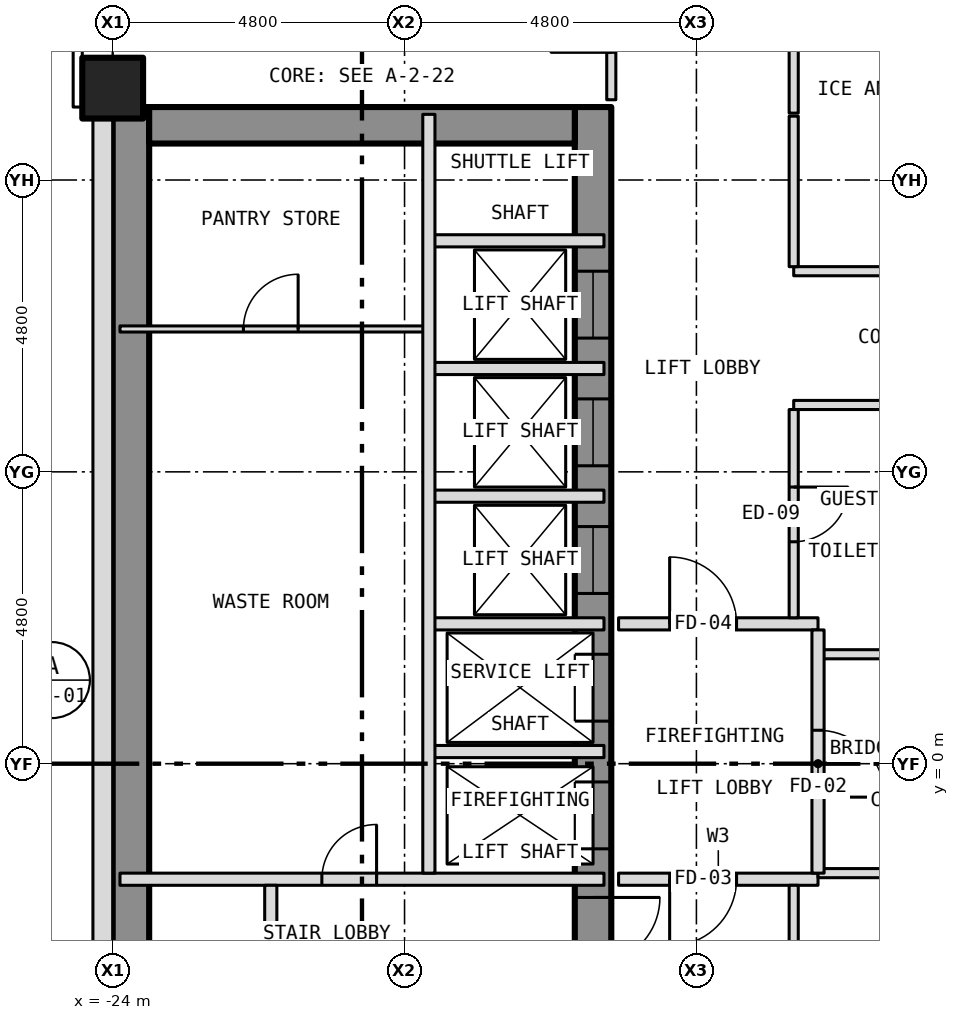
"""IFC4 building model, lengths in metres.
Left out: names, types, materials, properties, quantities, classifications, styles, units other than length and angle.
Written with IfcOpenShell. Run it as: python <this file> out.ifc"""

import sys

from ifc_helpers import new_model, si_unit, direction, frame, frame_2d, origin, origin_2d, place, context, subcontext, project, spatial, rectangle, hollow_rectangle, extrude, element, fill, save


model = new_model("IFC4")
c1 = context("Model", 3, precision=1e-05, world=origin(), true_north=direction((0.0, 1.0)))
c2 = subcontext(c1, "Body", "Model", "MODEL_VIEW")
j1 = project(units=[si_unit("LENGTHUNIT", "METRE"), si_unit("PLANEANGLEUNIT", "RADIAN")], contexts=[c1])
p1 = place(None, origin())
s1 = spatial("IfcSite", under=j1, at=p1, CompositionType="ELEMENT")
p2 = place(p1, origin())
s2 = spatial("IfcBuilding", under=s1, at=p2, CompositionType="ELEMENT")
p3 = place(p2, frame((0.0, 0.0, 81.0)))
s3 = spatial("IfcBuildingStorey", under=s2, at=p3, CompositionType="ELEMENT", Elevation=81.0)
p4 = place(p3, frame((-24.0, 11.111, -0.15), z_axis=(0.0, 0.0, 1.0), x_axis=(1.0, 0.0, 0.0)))
e1 = element("IfcColumn", 1, at=p4, inside=s3, PredefinedType="COLUMN", context=c2, shape_type="SweptSolid", body=[
    extrude(hollow_rectangle(XDim=1.0, YDim=1.0, WallThickness=0.06, at=origin_2d()), origin(), (0.0, 0.0, 1.0), 3.35),
])
p5 = place(p3, frame((-16.1, -10.8, 0.0), z_axis=(0.0, 0.0, 1.0), x_axis=(0.0, 1.0, 0.0)))
e2 = element("IfcWall", 2, at=p5, inside=s3, PredefinedType="SHEAR", context=c2, shape_type="SweptSolid", body=[
    extrude(rectangle(XDim=21.6, YDim=0.6, at=frame_2d((10.8, 0.0))), origin(), (0.0, 0.0, 1.0), 2.9),
])
p6 = place(p5, frame((9.4, 0.0, 0.0)))
e3 = element("IfcOpeningElement", 3, at=p6, cuts=e2, PredefinedType="OPENING", context=c2, shape_type="SweptSolid", body=[
    extrude(rectangle(XDim=1.1, YDim=2.1, at=frame_2d((0.55, 1.05))), frame((0.0, 0.312, 0.0), z_axis=(0.0, -1.0, 0.0), x_axis=(1.0, 0.0, 0.0)), (0.0, 0.0, 1.0), 0.624),
])
p7 = place(p5, frame((11.5, 0.0, 0.0)))
e4 = element("IfcOpeningElement", 4, at=p7, cuts=e2, PredefinedType="OPENING", context=c2, shape_type="SweptSolid", body=[
    extrude(rectangle(XDim=1.1, YDim=2.1, at=frame_2d((0.55, 1.05))), frame((0.0, 0.312, 0.0), z_axis=(0.0, -1.0, 0.0), x_axis=(1.0, 0.0, 0.0)), (0.0, 0.0, 1.0), 0.624),
])
p8 = place(p5, frame((13.6, 0.0, 0.0)))
e5 = element("IfcOpeningElement", 5, at=p8, cuts=e2, PredefinedType="OPENING", context=c2, shape_type="SweptSolid", body=[
    extrude(rectangle(XDim=1.1, YDim=2.1, at=frame_2d((0.55, 1.05))), frame((0.0, 0.312, 0.0), z_axis=(0.0, -1.0, 0.0), x_axis=(1.0, 0.0, 0.0)), (0.0, 0.0, 1.0), 0.624),
])
p9 = place(p5, frame((15.7, 0.0, 0.0)))
e6 = element("IfcOpeningElement", 6, at=p9, cuts=e2, PredefinedType="OPENING", context=c2, shape_type="SweptSolid", body=[
    extrude(rectangle(XDim=1.1, YDim=2.1, at=frame_2d((0.55, 1.05))), frame((0.0, 0.312, 0.0), z_axis=(0.0, -1.0, 0.0), x_axis=(1.0, 0.0, 0.0)), (0.0, 0.0, 1.0), 0.624),
])
p10 = place(p5, frame((17.8, 0.0, 0.0)))
e7 = element("IfcOpeningElement", 7, at=p10, cuts=e2, PredefinedType="OPENING", context=c2, shape_type="SweptSolid", body=[
    extrude(rectangle(XDim=1.1, YDim=2.1, at=frame_2d((0.55, 1.05))), frame((0.0, 0.312, 0.0), z_axis=(0.0, -1.0, 0.0), x_axis=(1.0, 0.0, 0.0)), (0.0, 0.0, 1.0), 0.624),
])
p11 = place(p5, frame((0.758, 0.0, 0.0)))
e8 = element("IfcOpeningElement", 8, at=p11, cuts=e2, PredefinedType="OPENING", context=c2, shape_type="SweptSolid", body=[
    extrude(rectangle(XDim=1.1, YDim=2.1, at=frame_2d((0.55, 1.05))), frame((0.0, 0.312, 0.0), z_axis=(0.0, -1.0, 0.0), x_axis=(1.0, 0.0, 0.0)), (0.0, 0.0, 1.0), 0.624),
])
p12 = place(p5, frame((7.5, 0.0, 0.0)))
e9 = element("IfcOpeningElement", 9, at=p12, cuts=e2, PredefinedType="OPENING", context=c2, shape_type="SweptSolid", body=[
    extrude(rectangle(XDim=1.1, YDim=2.1, at=frame_2d((0.55, 1.05))), frame((0.0, 0.312, 0.0), z_axis=(0.0, -1.0, 0.0), x_axis=(1.0, 0.0, 0.0)), (0.0, 0.0, 1.0), 0.624),
])
p13 = place(p3, frame((-23.7, -10.8, 0.0), z_axis=(0.0, 0.0, 1.0), x_axis=(0.0, 1.0, 0.0)))
e10 = element("IfcWall", 10, at=p13, inside=s3, PredefinedType="SHEAR", context=c2, shape_type="SweptSolid", body=[
    extrude(rectangle(XDim=21.6, YDim=0.6, at=frame_2d((10.8, 0.0))), origin(), (0.0, 0.0, 1.0), 2.9),
])
p14 = place(p3, frame((-23.4, 10.5, 0.0), z_axis=(0.0, 0.0, 1.0), x_axis=(1.0, 0.0, 0.0)))
e11 = element("IfcWall", 11, at=p14, inside=s3, PredefinedType="SHEAR", context=c2, shape_type="SweptSolid", body=[
    extrude(rectangle(XDim=7.0, YDim=0.6, at=frame_2d((3.5, 0.0))), origin(), (0.0, 0.0, 1.0), 2.9),
])
p15 = place(p3, frame((-24.163, 10.8, 0.0), z_axis=(0.0, 0.0, 1.0), x_axis=(0.0, -1.0, 0.0)))
e12 = element("IfcWall", 12, at=p15, inside=s3, PredefinedType="SOLIDWALL", context=c2, shape_type="SweptSolid", body=[
    extrude(rectangle(XDim=21.6, YDim=0.325, at=frame_2d((10.8, 0.0))), origin(), (0.0, 0.0, 1.0), 3.5),
])
p16 = place(p15, frame((18.05, 0.0, 1.0)))
e13 = element("IfcOpeningElement", 13, at=p16, cuts=e12, PredefinedType="OPENING", context=c2, shape_type="SweptSolid", body=[
    extrude(rectangle(XDim=0.6, YDim=1.5, at=frame_2d((0.3, 0.75))), frame((0.0, 0.175, 0.0), z_axis=(0.0, -1.0, 0.0), x_axis=(1.0, 0.0, 0.0)), (0.0, 0.0, 1.0), 0.349),
])
p17 = place(p3, frame((-23.88, -1.9, 0.0), z_axis=(0.0, 0.0, 1.0), x_axis=(1.0, 0.0, 0.0)))
e14 = element("IfcWall", 14, at=p17, inside=s3, PredefinedType="PARTITIONING", context=c2, shape_type="SweptSolid", body=[
    extrude(rectangle(XDim=7.96, YDim=0.2, at=frame_2d((3.98, 0.0))), origin(), (0.0, 0.0, 1.0), 2.9),
])
p18 = place(p17, frame((3.32, 0.0, 0.0)))
e15 = element("IfcOpeningElement", 15, at=p18, cuts=e14, PredefinedType="OPENING", context=c2, shape_type="SweptSolid", body=[
    extrude(rectangle(XDim=0.9, YDim=2.1, at=frame_2d((0.45, 1.05))), frame((0.0, 0.112, 0.0), z_axis=(0.0, -1.0, 0.0), x_axis=(1.0, 0.0, 0.0)), (0.0, 0.0, 1.0), 0.224),
])
p19 = place(p3, frame((-15.68, -1.9, 0.0), z_axis=(0.0, 0.0, 1.0), x_axis=(1.0, 0.0, 0.0)))
e16 = element("IfcWall", 16, at=p19, inside=s3, PredefinedType="PARTITIONING", context=c2, shape_type="SweptSolid", body=[
    extrude(rectangle(XDim=3.28, YDim=0.2, at=frame_2d((1.64, 0.0))), origin(), (0.0, 0.0, 1.0), 3.2),
])
p20 = place(p19, frame((0.84, 0.0, 0.0)))
e17 = element("IfcOpeningElement", 17, at=p20, cuts=e16, PredefinedType="OPENING", context=c2, shape_type="SweptSolid", body=[
    extrude(rectangle(XDim=1.1, YDim=2.1, at=frame_2d((0.55, 1.05))), frame((0.0, 0.112, 0.0), z_axis=(0.0, -1.0, 0.0), x_axis=(1.0, 0.0, 0.0)), (0.0, 0.0, 1.0), 0.224),
])
p21 = place(p3, frame((-12.4, -1.8, 0.0), z_axis=(0.0, 0.0, 1.0), x_axis=(1.0, 0.0, 0.0)))
e18 = element("IfcWall", 18, at=p21, inside=s3, PredefinedType="PARTITIONING", context=c2, shape_type="SweptSolid", body=[
    extrude(rectangle(XDim=3.28, YDim=0.15, at=frame_2d((1.64, 0.0))), origin(), (0.0, 0.0, 1.0), 3.2),
])
p22 = place(p3, frame((-18.8, 0.2, 0.0), z_axis=(0.0, 0.0, 1.0), x_axis=(1.0, 0.0, 0.0)))
e19 = element("IfcWall", 19, at=p22, inside=s3, PredefinedType="PARTITIONING", context=c2, shape_type="SweptSolid", body=[
    extrude(rectangle(XDim=2.88, YDim=0.2, at=frame_2d((1.44, 0.0))), origin(), (0.0, 0.0, 1.0), 2.9),
])
p23 = place(p3, frame((-12.4, 1.8, 0.0), z_axis=(0.0, 0.0, 1.0), x_axis=(1.0, 0.0, 0.0)))
e20 = element("IfcWall", 20, at=p23, inside=s3, PredefinedType="PARTITIONING", context=c2, shape_type="SweptSolid", body=[
    extrude(rectangle(XDim=3.25, YDim=0.15, at=frame_2d((1.625, 0.0))), origin(), (0.0, 0.0, 1.0), 3.2),
])
p24 = place(p3, frame((-18.8, 2.3, 0.0), z_axis=(0.0, 0.0, 1.0), x_axis=(1.0, 0.0, 0.0)))
e21 = element("IfcWall", 21, at=p24, inside=s3, PredefinedType="PARTITIONING", context=c2, shape_type="SweptSolid", body=[
    extrude(rectangle(XDim=2.88, YDim=0.2, at=frame_2d((1.44, 0.0))), origin(), (0.0, 0.0, 1.0), 2.9),
])
p25 = place(p3, frame((-15.68, 2.3, 0.0), z_axis=(0.0, 0.0, 1.0), x_axis=(1.0, 0.0, 0.0)))
e22 = element("IfcWall", 22, at=p25, inside=s3, PredefinedType="PARTITIONING", context=c2, shape_type="SweptSolid", body=[
    extrude(rectangle(XDim=3.28, YDim=0.2, at=frame_2d((1.64, 0.0))), origin(), (0.0, 0.0, 1.0), 3.2),
])
p26 = place(p25, frame((0.84, 0.0, 0.0)))
e23 = element("IfcOpeningElement", 23, at=p26, cuts=e22, PredefinedType="OPENING", context=c2, shape_type="SweptSolid", body=[
    extrude(rectangle(XDim=1.1, YDim=2.1, at=frame_2d((0.55, 1.05))), frame((0.0, 0.112, 0.0), z_axis=(0.0, -1.0, 0.0), x_axis=(1.0, 0.0, 0.0)), (0.0, 0.0, 1.0), 0.224),
])
p27 = place(p3, frame((-18.8, 4.4, 0.0), z_axis=(0.0, 0.0, 1.0), x_axis=(1.0, 0.0, 0.0)))
e24 = element("IfcWall", 24, at=p27, inside=s3, PredefinedType="PARTITIONING", context=c2, shape_type="SweptSolid", body=[
    extrude(rectangle(XDim=2.88, YDim=0.2, at=frame_2d((1.44, 0.0))), origin(), (0.0, 0.0, 1.0), 2.9),
])
p28 = place(p3, frame((-12.8, 5.9, 0.0), z_axis=(0.0, 0.0, 1.0), x_axis=(1.0, 0.0, 0.0)))
e25 = element("IfcWall", 25, at=p28, inside=s3, PredefinedType="PARTITIONING", context=c2, shape_type="SweptSolid", body=[
    extrude(rectangle(XDim=3.65, YDim=0.15, at=frame_2d((1.825, 0.0))), origin(), (0.0, 0.0, 1.0), 3.2),
])
p29 = place(p28, frame((2.288, 0.0, 0.0)))
e26 = element("IfcOpeningElement", 26, at=p29, cuts=e25, PredefinedType="OPENING", context=c2, shape_type="SweptSolid", body=[
    extrude(rectangle(XDim=0.9, YDim=2.1, at=frame_2d((0.45, 1.05))), frame((0.0, 0.087, 0.0), z_axis=(0.0, -1.0, 0.0), x_axis=(1.0, 0.0, 0.0)), (0.0, 0.0, 1.0), 0.174),
])
p30 = place(p3, frame((-18.8, 6.5, 0.0), z_axis=(0.0, 0.0, 1.0), x_axis=(1.0, 0.0, 0.0)))
e27 = element("IfcWall", 27, at=p30, inside=s3, PredefinedType="PARTITIONING", context=c2, shape_type="SweptSolid", body=[
    extrude(rectangle(XDim=2.88, YDim=0.2, at=frame_2d((1.44, 0.0))), origin(), (0.0, 0.0, 1.0), 2.9),
])
p31 = place(p3, frame((-23.88, 7.15, 0.0), z_axis=(0.0, 0.0, 1.0), x_axis=(1.0, 0.0, 0.0)))
e28 = element("IfcWall", 28, at=p31, inside=s3, PredefinedType="PARTITIONING", context=c2, shape_type="SweptSolid", body=[
    extrude(rectangle(XDim=5.08, YDim=0.1, at=frame_2d((2.54, 0.0))), origin(), (0.0, 0.0, 1.0), 2.9),
])
p32 = place(p31, frame((2.03, 0.0, 0.0)))
e29 = element("IfcOpeningElement", 29, at=p32, cuts=e28, PredefinedType="OPENING", context=c2, shape_type="SweptSolid", body=[
    extrude(rectangle(XDim=0.9, YDim=2.1, at=frame_2d((0.45, 1.05))), frame((0.0, 0.062, 0.0), z_axis=(0.0, -1.0, 0.0), x_axis=(1.0, 0.0, 0.0)), (0.0, 0.0, 1.0), 0.124),
])
p33 = place(p3, frame((-12.8, 8.1, 0.0), z_axis=(0.0, 0.0, 1.0), x_axis=(1.0, 0.0, 0.0)))
e30 = element("IfcWall", 30, at=p33, inside=s3, PredefinedType="PARTITIONING", context=c2, shape_type="SweptSolid", body=[
    extrude(rectangle(XDim=3.68, YDim=0.15, at=frame_2d((1.84, 0.0))), origin(), (0.0, 0.0, 1.0), 3.2),
])
p34 = place(p3, frame((-18.8, 8.6, 0.0), z_axis=(0.0, 0.0, 1.0), x_axis=(1.0, 0.0, 0.0)))
e31 = element("IfcWall", 31, at=p34, inside=s3, PredefinedType="PARTITIONING", context=c2, shape_type="SweptSolid", body=[
    extrude(rectangle(XDim=2.88, YDim=0.2, at=frame_2d((1.44, 0.0))), origin(), (0.0, 0.0, 1.0), 2.9),
])
p35 = place(p3, frame((-21.4, -10.68, 0.0), z_axis=(0.0, 0.0, 1.0), x_axis=(0.0, 1.0, 0.0)))
e32 = element("IfcWall", 32, at=p35, inside=s3, PredefinedType="PARTITIONING", context=c2, shape_type="SweptSolid", body=[
    extrude(rectangle(XDim=8.68, YDim=0.2, at=frame_2d((4.34, 0.0))), origin(), (0.0, 0.0, 1.0), 2.9),
])
p36 = place(p35, frame((1.21, 0.0, 0.0)))
e33 = element("IfcOpeningElement", 33, at=p36, cuts=e32, PredefinedType="OPENING", context=c2, shape_type="SweptSolid", body=[
    extrude(rectangle(XDim=0.9, YDim=2.1, at=frame_2d((0.45, 1.05))), frame((0.0, 0.112, 0.0), z_axis=(0.0, -1.0, 0.0), x_axis=(1.0, 0.0, 0.0)), (0.0, 0.0, 1.0), 0.224),
])
p37 = place(p35, frame((5.66, 0.0, 0.0)))
e34 = element("IfcOpeningElement", 34, at=p37, cuts=e32, PredefinedType="OPENING", context=c2, shape_type="SweptSolid", body=[
    extrude(rectangle(XDim=0.9, YDim=2.1, at=frame_2d((0.45, 1.05))), frame((0.0, 0.112, 0.0), z_axis=(0.0, -1.0, 0.0), x_axis=(1.0, 0.0, 0.0)), (0.0, 0.0, 1.0), 0.224),
])
p38 = place(p3, frame((-18.8, -1.8, 0.0), z_axis=(0.0, 0.0, 1.0), x_axis=(0.0, 1.0, 0.0)))
e35 = element("IfcWall", 35, at=p38, inside=s3, PredefinedType="PARTITIONING", context=c2, shape_type="SweptSolid", body=[
    extrude(rectangle(XDim=12.48, YDim=0.2, at=frame_2d((6.24, 0.0))), origin(), (0.0, 0.0, 1.0), 2.9),
])
p39 = place(p3, frame((-15.8, 10.92, 0.0), z_axis=(0.0, 0.0, 1.0), x_axis=(0.0, 1.0, 0.0)))
e36 = element("IfcWall", 36, at=p39, inside=s3, PredefinedType="PARTITIONING", context=c2, shape_type="SweptSolid", body=[
    extrude(rectangle(XDim=4.805, YDim=0.15, at=frame_2d((2.403, 0.0))), origin(), (0.0, 0.0, 1.0), 3.2),
])
p40 = place(p39, frame((0.78, 0.0, 0.0)))
e37 = element("IfcOpeningElement", 37, at=p40, cuts=e36, PredefinedType="OPENING", context=c2, shape_type="SweptSolid", body=[
    extrude(rectangle(XDim=1.0, YDim=2.1, at=frame_2d((0.5, 1.05))), frame((0.0, 0.087, 0.0), z_axis=(0.0, -1.0, 0.0), x_axis=(1.0, 0.0, 0.0)), (0.0, 0.0, 1.0), 0.174),
])
p41 = place(p3, frame((-12.8, -13.525, 0.0), z_axis=(0.0, 0.0, 1.0), x_axis=(0.0, 1.0, 0.0)))
e38 = element("IfcWall", 38, at=p41, inside=s3, PredefinedType="PARTITIONING", context=c2, shape_type="SweptSolid", body=[
    extrude(rectangle(XDim=11.525, YDim=0.15, at=frame_2d((5.762, 0.0))), origin(), (0.0, 0.0, 1.0), 3.2),
])
p42 = place(p41, frame((6.725, 0.0, 0.0)))
e39 = element("IfcOpeningElement", 39, at=p42, cuts=e38, PredefinedType="OPENING", context=c2, shape_type="SweptSolid", body=[
    extrude(rectangle(XDim=0.9, YDim=2.1, at=frame_2d((0.45, 1.05))), frame((0.0, 0.087, 0.0), z_axis=(0.0, -1.0, 0.0), x_axis=(1.0, 0.0, 0.0)), (0.0, 0.0, 1.0), 0.174),
])
p43 = place(p3, frame((-12.8, 2.4, 0.0), z_axis=(0.0, 0.0, 1.0), x_axis=(0.0, 1.0, 0.0)))
e40 = element("IfcWall", 40, at=p43, inside=s3, PredefinedType="PARTITIONING", context=c2, shape_type="SweptSolid", body=[
    extrude(rectangle(XDim=3.425, YDim=0.15, at=frame_2d((1.712, 0.0))), origin(), (0.0, 0.0, 1.0), 3.2),
])
p44 = place(p43, frame((1.25, 0.0, 0.0)))
e41 = element("IfcOpeningElement", 41, at=p44, cuts=e40, PredefinedType="OPENING", context=c2, shape_type="SweptSolid", body=[
    extrude(rectangle(XDim=0.9, YDim=2.1, at=frame_2d((0.45, 1.05))), frame((0.0, 0.087, 0.0), z_axis=(0.0, -1.0, 0.0), x_axis=(1.0, 0.0, 0.0)), (0.0, 0.0, 1.0), 0.174),
])
p45 = place(p3, frame((-12.8, 8.175, 0.0), z_axis=(0.0, 0.0, 1.0), x_axis=(0.0, 1.0, 0.0)))
e42 = element("IfcWall", 42, at=p45, inside=s3, PredefinedType="PARTITIONING", context=c2, shape_type="SweptSolid", body=[
    extrude(rectangle(XDim=2.475, YDim=0.15, at=frame_2d((1.237, 0.0))), origin(), (0.0, 0.0, 1.0), 3.2),
])
p46 = place(p3, frame((-12.8, 10.7, 0.0), z_axis=(0.0, 0.0, 1.0), x_axis=(0.0, 1.0, 0.0)))
e43 = element("IfcWall", 43, at=p46, inside=s3, PredefinedType="PARTITIONING", context=c2, shape_type="SweptSolid", body=[
    extrude(rectangle(XDim=2.825, YDim=0.15, at=frame_2d((1.413, 0.0))), origin(), (0.0, 0.0, 1.0), 3.2),
])
p47 = place(p3, frame((-12.4, -1.8, 0.0), z_axis=(0.0, 0.0, 1.0), x_axis=(0.0, 1.0, 0.0)))
e44 = element("IfcWall", 44, at=p47, inside=s3, PredefinedType="PARTITIONING", context=c2, shape_type="SweptSolid", body=[
    extrude(rectangle(XDim=4.0, YDim=0.2, at=frame_2d((2.0, 0.0))), origin(), (0.0, 0.0, 1.0), 3.2),
])
p48 = place(p47, frame((1.25, 0.0, 0.0)))
e45 = element("IfcOpeningElement", 45, at=p48, cuts=e44, PredefinedType="OPENING", context=c2, shape_type="SweptSolid", body=[
    extrude(rectangle(XDim=1.1, YDim=2.1, at=frame_2d((0.55, 1.05))), frame((0.0, 0.112, 0.0), z_axis=(0.0, -1.0, 0.0), x_axis=(1.0, 0.0, 0.0)), (0.0, 0.0, 1.0), 0.224),
])
p49 = place(p6, origin())
e46 = element("IfcDoor", 46, at=p49, inside=s3, OperationType="SLIDING_TO_LEFT", PredefinedType="DOOR", context=c2, shape_type="SweptSolid", body=[
    extrude(rectangle(XDim=1.1, YDim=2.1, at=frame_2d((0.55, 1.05))), frame((0.0, 0.025, 0.0), z_axis=(0.0, -1.0, 0.0), x_axis=(1.0, 0.0, 0.0)), (0.0, 0.0, 1.0), 0.05),
])
fill(e3, e46)
p50 = place(p7, origin())
e47 = element("IfcDoor", 47, at=p50, inside=s3, OperationType="SLIDING_TO_LEFT", PredefinedType="DOOR", context=c2, shape_type="SweptSolid", body=[
    extrude(rectangle(XDim=1.1, YDim=2.1, at=frame_2d((0.55, 1.05))), frame((0.0, 0.025, 0.0), z_axis=(0.0, -1.0, 0.0), x_axis=(1.0, 0.0, 0.0)), (0.0, 0.0, 1.0), 0.05),
])
fill(e4, e47)
p51 = place(p8, origin())
e48 = element("IfcDoor", 48, at=p51, inside=s3, OperationType="SLIDING_TO_LEFT", PredefinedType="DOOR", context=c2, shape_type="SweptSolid", body=[
    extrude(rectangle(XDim=1.1, YDim=2.1, at=frame_2d((0.55, 1.05))), frame((0.0, 0.025, 0.0), z_axis=(0.0, -1.0, 0.0), x_axis=(1.0, 0.0, 0.0)), (0.0, 0.0, 1.0), 0.05),
])
fill(e5, e48)
p52 = place(p9, origin())
e49 = element("IfcDoor", 49, at=p52, inside=s3, OperationType="SLIDING_TO_LEFT", PredefinedType="DOOR", context=c2, shape_type="SweptSolid", body=[
    extrude(rectangle(XDim=1.1, YDim=2.1, at=frame_2d((0.55, 1.05))), frame((0.0, 0.025, 0.0), z_axis=(0.0, -1.0, 0.0), x_axis=(1.0, 0.0, 0.0)), (0.0, 0.0, 1.0), 0.05),
])
fill(e6, e49)
p53 = place(p10, origin())
e50 = element("IfcDoor", 50, at=p53, inside=s3, OperationType="SLIDING_TO_LEFT", PredefinedType="DOOR", context=c2, shape_type="SweptSolid", body=[
    extrude(rectangle(XDim=1.1, YDim=2.1, at=frame_2d((0.55, 1.05))), frame((0.0, 0.025, 0.0), z_axis=(0.0, -1.0, 0.0), x_axis=(1.0, 0.0, 0.0)), (0.0, 0.0, 1.0), 0.05),
])
fill(e7, e50)
p54 = place(p12, origin())
e51 = element("IfcDoor", 51, at=p54, inside=s3, OperationType="SINGLE_SWING_RIGHT", PredefinedType="DOOR", context=c2, shape_type="SweptSolid", body=[
    extrude(rectangle(XDim=1.1, YDim=2.1, at=frame_2d((0.55, 1.05))), frame((0.0, 0.025, 0.0), z_axis=(0.0, -1.0, 0.0), x_axis=(1.0, 0.0, 0.0)), (0.0, 0.0, 1.0), 0.05),
])
fill(e9, e51)
p55 = place(p18, origin())
e52 = element("IfcDoor", 52, at=p55, inside=s3, OperationType="SINGLE_SWING_RIGHT", PredefinedType="DOOR", context=c2, shape_type="SweptSolid", body=[
    extrude(rectangle(XDim=0.9, YDim=2.1, at=frame_2d((0.45, 1.05))), frame((0.0, 0.025, 0.0), z_axis=(0.0, -1.0, 0.0), x_axis=(1.0, 0.0, 0.0)), (0.0, 0.0, 1.0), 0.05),
])
fill(e15, e52)
p56 = place(p32, origin())
e53 = element("IfcDoor", 53, at=p56, inside=s3, OperationType="SINGLE_SWING_RIGHT", PredefinedType="DOOR", context=c2, shape_type="SweptSolid", body=[
    extrude(rectangle(XDim=0.9, YDim=2.1, at=frame_2d((0.45, 1.05))), frame((0.0, 0.025, 0.0), z_axis=(0.0, -1.0, 0.0), x_axis=(1.0, 0.0, 0.0)), (0.0, 0.0, 1.0), 0.05),
])
fill(e29, e53)
p57 = place(p48, origin())
e54 = element("IfcDoor", 54, at=p57, inside=s3, OperationType="SINGLE_SWING_LEFT", PredefinedType="DOOR", context=c2, shape_type="SweptSolid", body=[
    extrude(rectangle(XDim=1.1, YDim=2.1, at=frame_2d((0.55, 1.05))), frame((0.0, 0.025, 0.0), z_axis=(0.0, -1.0, 0.0), x_axis=(1.0, 0.0, 0.0)), (0.0, 0.0, 1.0), 0.05),
])
fill(e45, e54)
p58 = place(p20, origin())
e55 = element("IfcDoor", 55, at=p58, inside=s3, OperationType="SINGLE_SWING_LEFT", PredefinedType="DOOR", context=c2, shape_type="SweptSolid", body=[
    extrude(rectangle(XDim=1.1, YDim=2.1, at=frame_2d((0.55, 1.05))), frame((0.0, 0.025, 0.0), z_axis=(0.0, -1.0, 0.0), x_axis=(1.0, 0.0, 0.0)), (0.0, 0.0, 1.0), 0.05),
])
fill(e17, e55)
p59 = place(p26, origin())
e56 = element("IfcDoor", 56, at=p59, inside=s3, OperationType="SINGLE_SWING_LEFT", PredefinedType="DOOR", context=c2, shape_type="SweptSolid", body=[
    extrude(rectangle(XDim=1.1, YDim=2.1, at=frame_2d((0.55, 1.05))), frame((0.0, 0.025, 0.0), z_axis=(0.0, -1.0, 0.0), x_axis=(1.0, 0.0, 0.0)), (0.0, 0.0, 1.0), 0.05),
])
fill(e23, e56)
p60 = place(p44, origin())
e57 = element("IfcDoor", 57, at=p60, inside=s3, OperationType="SINGLE_SWING_RIGHT", PredefinedType="DOOR", context=c2, shape_type="SweptSolid", body=[
    extrude(rectangle(XDim=0.9, YDim=2.1, at=frame_2d((0.45, 1.05))), frame((0.0, 0.025, 0.0), z_axis=(0.0, -1.0, 0.0), x_axis=(1.0, 0.0, 0.0)), (0.0, 0.0, 1.0), 0.05),
])
fill(e41, e57)
save(model, sys.argv[1])
